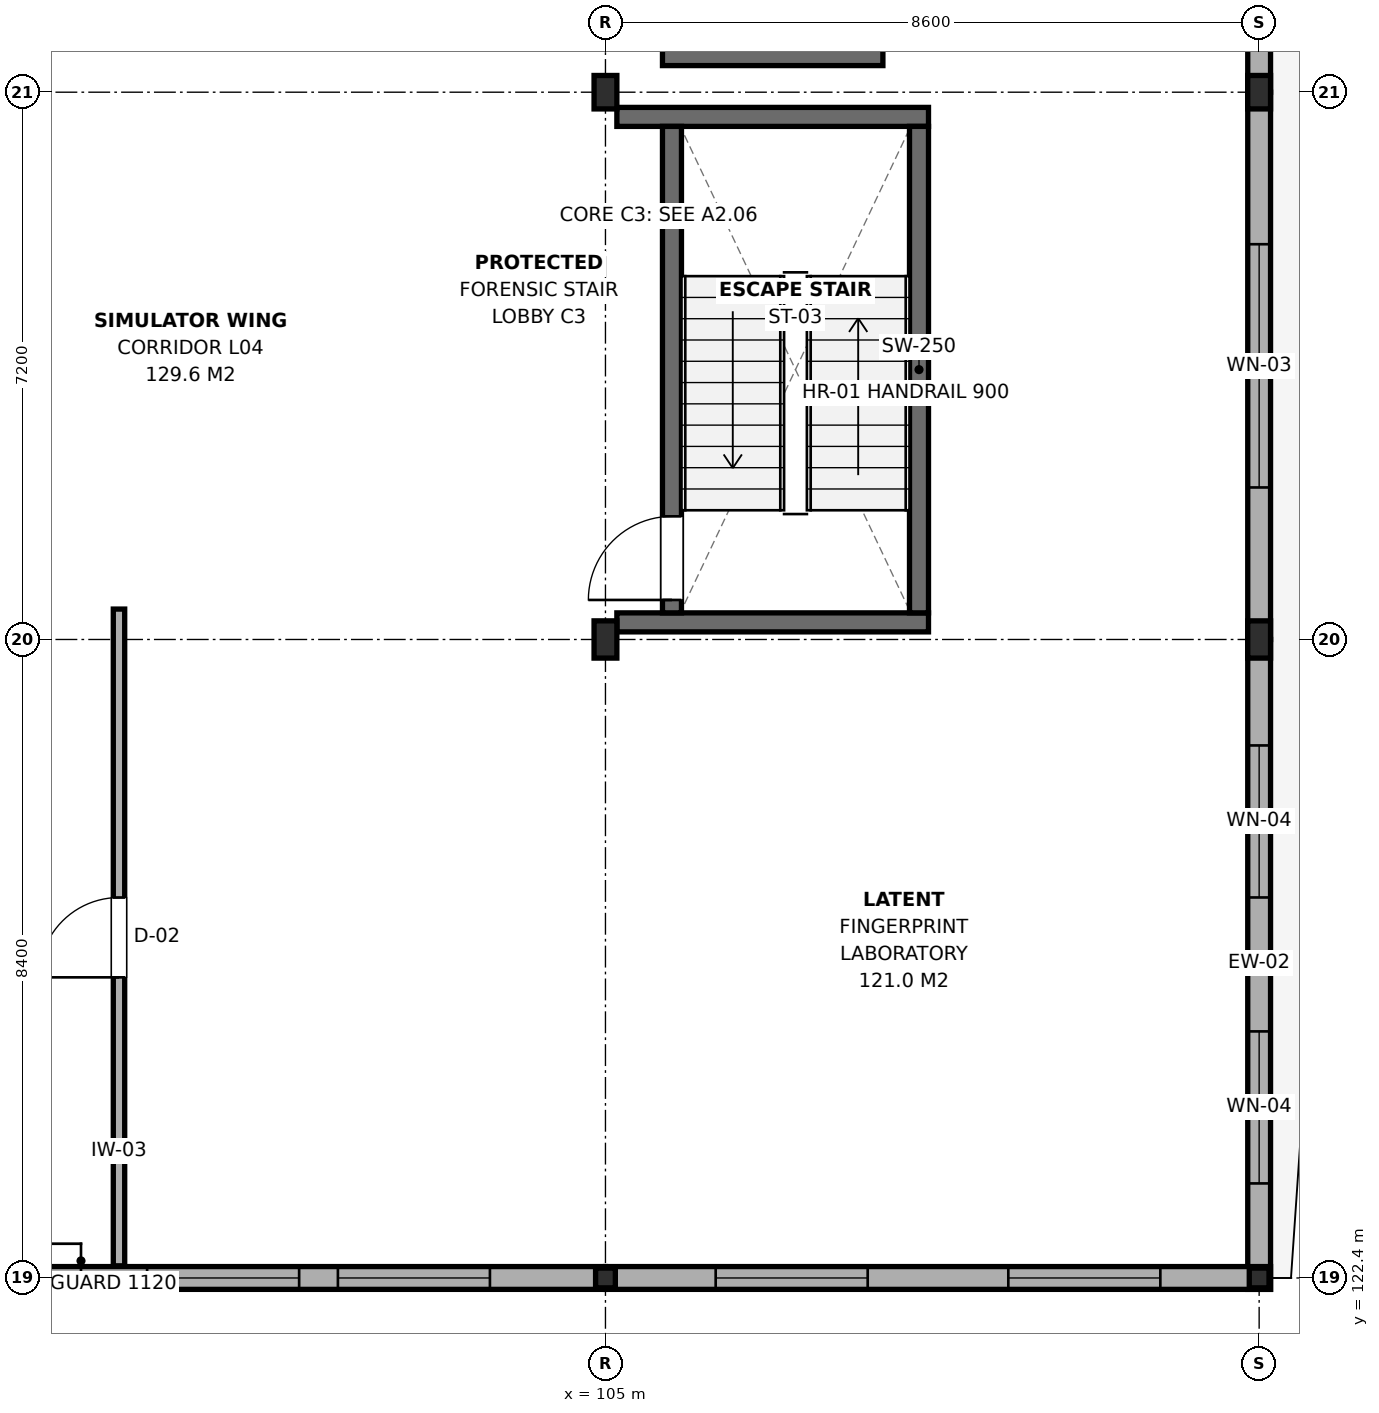
"""IFC4 building model, lengths in metres.
Left out: names, types, materials, properties, quantities, classifications, styles, units other than length and angle.
Written with IfcOpenShell. Run it as: python <this file> out.ifc"""

import sys

from ifc_helpers import new_model, si_unit, direction, frame, frame_2d, origin, origin_2d, place, context, subcontext, project, spatial, rectangle, i_section, extrude, element, fill, save


model = new_model("IFC4")
c1 = context("Model", 3, precision=1e-05, world=origin(), true_north=direction((0.0, 1.0)))
c2 = subcontext(c1, "Body", "Model", "MODEL_VIEW")
j1 = project(units=[si_unit("LENGTHUNIT", "METRE"), si_unit("PLANEANGLEUNIT", "RADIAN")], contexts=[c1])
p1 = place(None, origin())
s1 = spatial("IfcSite", under=j1, at=p1, CompositionType="ELEMENT")
p2 = place(p1, origin())
s2 = spatial("IfcBuilding", under=s1, at=p2, CompositionType="ELEMENT")
p3 = place(p2, frame((0.0, 0.0, 17.1)))
s3 = spatial("IfcBuildingStorey", under=s2, at=p3, CompositionType="ELEMENT", Elevation=17.1)
p4 = place(p3, frame((105.0, 122.4, 0.0), z_axis=(0.0, 0.0, 1.0), x_axis=(1.0, 0.0, 0.0)))
e1 = element("IfcColumn", 1, at=p4, inside=s3, PredefinedType="COLUMN", context=c2, shape_type="SweptSolid", body=[
    extrude(i_section(OverallWidth=0.26, OverallDepth=0.26, WebThickness=0.01, FlangeThickness=0.018, FilletRadius=0.024, at=origin_2d()), origin(), (0.0, 0.0, 1.0), 3.9),
])
p5 = place(p3, frame((105.0, 130.8, 0.0), z_axis=(0.0, 0.0, 1.0), x_axis=(1.0, 0.0, 0.0)))
e2 = element("IfcColumn", 2, at=p5, inside=s3, PredefinedType="COLUMN", context=c2, shape_type="SweptSolid", body=[
    extrude(i_section(OverallWidth=0.3, OverallDepth=0.49, WebThickness=0.012, FlangeThickness=0.023, FilletRadius=0.027, at=origin_2d()), origin(), (0.0, 0.0, 1.0), 3.9),
])
p6 = place(p3, frame((105.0, 138.0, 0.0), z_axis=(0.0, 0.0, 1.0), x_axis=(1.0, 0.0, 0.0)))
e3 = element("IfcColumn", 3, at=p6, inside=s3, PredefinedType="COLUMN", context=c2, shape_type="SweptSolid", body=[
    extrude(i_section(OverallWidth=0.3, OverallDepth=0.44, WebThickness=0.011, FlangeThickness=0.021, FilletRadius=0.027, at=origin_2d()), origin(), (0.0, 0.0, 1.0), 3.9),
])
p7 = place(p3, frame((113.6, 122.4, 0.0), z_axis=(0.0, 0.0, 1.0), x_axis=(1.0, 0.0, 0.0)))
e4 = element("IfcColumn", 4, at=p7, inside=s3, PredefinedType="COLUMN", context=c2, shape_type="SweptSolid", body=[
    extrude(i_section(OverallWidth=0.26, OverallDepth=0.26, WebThickness=0.01, FlangeThickness=0.018, FilletRadius=0.024, at=origin_2d()), origin(), (0.0, 0.0, 1.0), 3.9),
])
p8 = place(p3, frame((113.6, 130.8, 0.0), z_axis=(0.0, 0.0, 1.0), x_axis=(1.0, 0.0, 0.0)))
e5 = element("IfcColumn", 5, at=p8, inside=s3, PredefinedType="COLUMN", context=c2, shape_type="SweptSolid", body=[
    extrude(i_section(OverallWidth=0.3, OverallDepth=0.49, WebThickness=0.012, FlangeThickness=0.023, FilletRadius=0.027, at=origin_2d()), origin(), (0.0, 0.0, 1.0), 3.9),
])
p9 = place(p3, frame((113.6, 138.0, 0.0), z_axis=(0.0, 0.0, 1.0), x_axis=(1.0, 0.0, 0.0)))
e6 = element("IfcColumn", 6, at=p9, inside=s3, PredefinedType="COLUMN", context=c2, shape_type="SweptSolid", body=[
    extrude(i_section(OverallWidth=0.3, OverallDepth=0.44, WebThickness=0.011, FlangeThickness=0.021, FilletRadius=0.027, at=origin_2d()), origin(), (0.0, 0.0, 1.0), 3.9),
])
for number, where, z_axis, x_axis in (
    (7, (105.15, 131.025, 0.0), (0.0, 0.0, 1.0), (1.0, 0.0, 0.0)),
    (8, (105.15, 137.675, 0.0), (0.0, 0.0, 1.0), (1.0, 0.0, 0.0)),
):
    element("IfcWall", number, at=place(p3, frame(where, z_axis=z_axis, x_axis=x_axis)), inside=s3, PredefinedType="SHEAR", context=c2, shape_type="SweptSolid", body=[
        extrude(rectangle(XDim=4.1, YDim=0.25, at=frame_2d((2.05, 0.0))), origin(), (0.0, 0.0, 1.0), 3.7),
    ])
p10 = place(p3, frame((105.875, 131.15, 0.0), z_axis=(0.0, 0.0, 1.0), x_axis=(0.0, 1.0, 0.0)))
e9 = element("IfcWall", 9, at=p10, inside=s3, PredefinedType="SHEAR", context=c2, shape_type="SweptSolid", body=[
    extrude(rectangle(XDim=6.4, YDim=0.25, at=frame_2d((3.2, 0.0))), origin(), (0.0, 0.0, 1.0), 3.7),
])
p11 = place(p10, frame((0.17, 0.0, 0.0)))
e10 = element("IfcOpeningElement", 10, at=p11, cuts=e9, PredefinedType="OPENING", context=c2, shape_type="SweptSolid", body=[
    extrude(rectangle(XDim=1.1, YDim=2.15, at=frame_2d((0.55, 1.075))), frame((0.0, 0.14, 0.0), z_axis=(0.0, -1.0, 0.0), x_axis=(1.0, 0.0, 0.0)), (0.0, 0.0, 1.0), 0.28),
])
p12 = place(p3, frame((109.125, 131.15, 0.0), z_axis=(0.0, 0.0, 1.0), x_axis=(0.0, 1.0, 0.0)))
e11 = element("IfcWall", 11, at=p12, inside=s3, PredefinedType="SHEAR", context=c2, shape_type="SweptSolid", body=[
    extrude(rectangle(XDim=6.4, YDim=0.25, at=frame_2d((3.2, 0.0))), origin(), (0.0, 0.0, 1.0), 3.7),
])
p13 = place(p3, frame((105.75, 138.475, 0.0), z_axis=(0.0, 0.0, 1.0), x_axis=(1.0, 0.0, 0.0)))
e12 = element("IfcWall", 12, at=p13, inside=s3, PredefinedType="SHEAR", context=c2, shape_type="SweptSolid", body=[
    extrude(rectangle(XDim=2.9, YDim=0.25, at=frame_2d((1.45, 0.0))), origin(), (0.0, 0.0, 1.0), 3.7),
])
p14 = place(p3, frame((113.6, 122.25, 0.0), z_axis=(0.0, 0.0, 1.0), x_axis=(0.0, 1.0, 0.0)))
e13 = element("IfcWall", 13, at=p14, inside=s3, PredefinedType="SOLIDWALL", context=c2, shape_type="SweptSolid", body=[
    extrude(rectangle(XDim=8.55, YDim=0.3, at=frame_2d((4.275, 0.0))), origin(), (0.0, 0.0, 1.0), 3.345),
])
p15 = place(p14, frame((1.394, 0.0, 0.95)))
e14 = element("IfcOpeningElement", 14, at=p15, cuts=e13, PredefinedType="OPENING", context=c2, shape_type="SweptSolid", body=[
    extrude(rectangle(XDim=2.0, YDim=1.8, at=frame_2d((1.0, 0.9))), frame((0.0, 0.165, 0.0), z_axis=(0.0, -1.0, 0.0), x_axis=(1.0, 0.0, 0.0)), (0.0, 0.0, 1.0), 0.33),
])
p16 = place(p14, frame((5.156, 0.0, 0.95)))
e15 = element("IfcOpeningElement", 15, at=p16, cuts=e13, PredefinedType="OPENING", context=c2, shape_type="SweptSolid", body=[
    extrude(rectangle(XDim=2.0, YDim=1.8, at=frame_2d((1.0, 0.9))), frame((0.0, 0.165, 0.0), z_axis=(0.0, -1.0, 0.0), x_axis=(1.0, 0.0, 0.0)), (0.0, 0.0, 1.0), 0.33),
])
p17 = place(p3, frame((113.6, 130.8, 0.0), z_axis=(0.0, 0.0, 1.0), x_axis=(0.0, 1.0, 0.0)))
e16 = element("IfcWall", 16, at=p17, inside=s3, PredefinedType="SOLIDWALL", context=c2, shape_type="SweptSolid", body=[
    extrude(rectangle(XDim=7.2, YDim=0.3, at=frame_2d((3.6, 0.0))), origin(), (0.0, 0.0, 1.0), 3.345),
])
p18 = place(p17, frame((2.0, 0.0, 0.95)))
e17 = element("IfcOpeningElement", 17, at=p18, cuts=e16, PredefinedType="OPENING", context=c2, shape_type="SweptSolid", body=[
    extrude(rectangle(XDim=3.2, YDim=2.2, at=frame_2d((1.6, 1.1))), frame((0.0, 0.165, 0.0), z_axis=(0.0, -1.0, 0.0), x_axis=(1.0, 0.0, 0.0)), (0.0, 0.0, 1.0), 0.33),
])
p19 = place(p3, frame((113.6, 138.0, 0.0), z_axis=(0.0, 0.0, 1.0), x_axis=(0.0, 1.0, 0.0)))
e18 = element("IfcWall", 18, at=p19, inside=s3, PredefinedType="SOLIDWALL", context=c2, shape_type="SweptSolid", body=[
    extrude(rectangle(XDim=7.2, YDim=0.3, at=frame_2d((3.6, 0.0))), origin(), (0.0, 0.0, 1.0), 3.095),
])
p20 = place(p19, frame((1.75, 0.0, 0.65)))
e19 = element("IfcOpeningElement", 19, at=p20, cuts=e18, PredefinedType="OPENING", context=c2, shape_type="SweptSolid", body=[
    extrude(rectangle(XDim=1.8, YDim=1.2, at=frame_2d((0.9, 0.6))), frame((0.0, 0.165, 0.0), z_axis=(0.0, -1.0, 0.0), x_axis=(1.0, 0.0, 0.0)), (0.0, 0.0, 1.0), 0.33),
])
p21 = place(p3, frame((96.0, 122.4, 0.0), z_axis=(0.0, 0.0, 1.0), x_axis=(1.0, 0.0, 0.0)))
e20 = element("IfcWall", 20, at=p21, inside=s3, PredefinedType="SOLIDWALL", context=c2, shape_type="SweptSolid", body=[
    extrude(rectangle(XDim=9.0, YDim=0.3, at=frame_2d((4.5, 0.0))), origin(), (0.0, 0.0, 1.0), 3.155),
])
p22 = place(p21, frame((2.97, 0.0, 0.65)))
e21 = element("IfcOpeningElement", 21, at=p22, cuts=e20, PredefinedType="OPENING", context=c2, shape_type="SweptSolid", body=[
    extrude(rectangle(XDim=2.0, YDim=1.8, at=frame_2d((1.0, 0.9))), frame((0.0, 0.165, 0.0), z_axis=(0.0, -1.0, 0.0), x_axis=(1.0, 0.0, 0.0)), (0.0, 0.0, 1.0), 0.33),
])
p23 = place(p21, frame((5.48, 0.0, 0.65)))
e22 = element("IfcOpeningElement", 22, at=p23, cuts=e20, PredefinedType="OPENING", context=c2, shape_type="SweptSolid", body=[
    extrude(rectangle(XDim=2.0, YDim=1.8, at=frame_2d((1.0, 0.9))), frame((0.0, 0.165, 0.0), z_axis=(0.0, -1.0, 0.0), x_axis=(1.0, 0.0, 0.0)), (0.0, 0.0, 1.0), 0.33),
])
p24 = place(p3, frame((105.0, 122.4, 0.0), z_axis=(0.0, 0.0, 1.0), x_axis=(1.0, 0.0, 0.0)))
e23 = element("IfcWall", 23, at=p24, inside=s3, PredefinedType="SOLIDWALL", context=c2, shape_type="SweptSolid", body=[
    extrude(rectangle(XDim=8.75, YDim=0.3, at=frame_2d((4.375, 0.0))), origin(), (0.0, 0.0, 1.0), 3.205),
])
p25 = place(p24, frame((1.45, 0.0, 0.65)))
e24 = element("IfcOpeningElement", 24, at=p25, cuts=e23, PredefinedType="OPENING", context=c2, shape_type="SweptSolid", body=[
    extrude(rectangle(XDim=2.0, YDim=1.8, at=frame_2d((1.0, 0.9))), frame((0.0, 0.165, 0.0), z_axis=(0.0, -1.0, 0.0), x_axis=(1.0, 0.0, 0.0)), (0.0, 0.0, 1.0), 0.33),
])
p26 = place(p24, frame((5.3, 0.0, 0.65)))
e25 = element("IfcOpeningElement", 25, at=p26, cuts=e23, PredefinedType="OPENING", context=c2, shape_type="SweptSolid", body=[
    extrude(rectangle(XDim=2.0, YDim=1.8, at=frame_2d((1.0, 0.9))), frame((0.0, 0.165, 0.0), z_axis=(0.0, -1.0, 0.0), x_axis=(1.0, 0.0, 0.0)), (0.0, 0.0, 1.0), 0.33),
])
p27 = place(p3, frame((98.6, 122.56, 0.0), z_axis=(0.0, 0.0, 1.0), x_axis=(0.0, 1.0, 0.0)))
e26 = element("IfcWall", 26, at=p27, inside=s3, PredefinedType="PARTITIONING", context=c2, shape_type="SweptSolid", body=[
    extrude(rectangle(XDim=8.64, YDim=0.15, at=frame_2d((4.32, 0.0))), origin(), (0.0, 0.0, 1.0), 3.205),
])
p28 = place(p27, frame((3.795, 0.0, 0.0)))
e27 = element("IfcOpeningElement", 27, at=p28, cuts=e26, PredefinedType="OPENING", context=c2, shape_type="SweptSolid", body=[
    extrude(rectangle(XDim=1.05, YDim=2.15, at=frame_2d((0.525, 1.075))), frame((0.0, 0.09, 0.0), z_axis=(0.0, -1.0, 0.0), x_axis=(1.0, 0.0, 0.0)), (0.0, 0.0, 1.0), 0.18),
])
p29 = place(p15, origin())
e28 = element("IfcWindow", 28, at=p29, inside=s3, PartitioningType="SINGLE_PANEL", PredefinedType="WINDOW", context=c2, shape_type="SweptSolid", body=[
    extrude(rectangle(XDim=2.0, YDim=1.8, at=frame_2d((1.0, 0.9))), frame((0.0, 0.03, 0.0), z_axis=(0.0, -1.0, 0.0), x_axis=(1.0, 0.0, 0.0)), (0.0, 0.0, 1.0), 0.06),
])
fill(e14, e28)
p30 = place(p16, origin())
e29 = element("IfcWindow", 29, at=p30, inside=s3, PartitioningType="SINGLE_PANEL", PredefinedType="WINDOW", context=c2, shape_type="SweptSolid", body=[
    extrude(rectangle(XDim=2.0, YDim=1.8, at=frame_2d((1.0, 0.9))), frame((0.0, 0.03, 0.0), z_axis=(0.0, -1.0, 0.0), x_axis=(1.0, 0.0, 0.0)), (0.0, 0.0, 1.0), 0.06),
])
fill(e15, e29)
p31 = place(p18, origin())
e30 = element("IfcWindow", 30, at=p31, inside=s3, PartitioningType="SINGLE_PANEL", PredefinedType="WINDOW", context=c2, shape_type="SweptSolid", body=[
    extrude(rectangle(XDim=3.2, YDim=2.2, at=frame_2d((1.6, 1.1))), frame((0.0, 0.03, 0.0), z_axis=(0.0, -1.0, 0.0), x_axis=(1.0, 0.0, 0.0)), (0.0, 0.0, 1.0), 0.06),
])
fill(e17, e30)
p32 = place(p22, origin())
e31 = element("IfcWindow", 31, at=p32, inside=s3, PartitioningType="SINGLE_PANEL", PredefinedType="WINDOW", context=c2, shape_type="SweptSolid", body=[
    extrude(rectangle(XDim=2.0, YDim=1.8, at=frame_2d((1.0, 0.9))), frame((0.0, 0.03, 0.0), z_axis=(0.0, -1.0, 0.0), x_axis=(1.0, 0.0, 0.0)), (0.0, 0.0, 1.0), 0.06),
])
fill(e21, e31)
p33 = place(p23, origin())
e32 = element("IfcWindow", 32, at=p33, inside=s3, PartitioningType="SINGLE_PANEL", PredefinedType="WINDOW", context=c2, shape_type="SweptSolid", body=[
    extrude(rectangle(XDim=2.0, YDim=1.8, at=frame_2d((1.0, 0.9))), frame((0.0, 0.03, 0.0), z_axis=(0.0, -1.0, 0.0), x_axis=(1.0, 0.0, 0.0)), (0.0, 0.0, 1.0), 0.06),
])
fill(e22, e32)
p34 = place(p25, origin())
e33 = element("IfcWindow", 33, at=p34, inside=s3, PartitioningType="SINGLE_PANEL", PredefinedType="WINDOW", context=c2, shape_type="SweptSolid", body=[
    extrude(rectangle(XDim=2.0, YDim=1.8, at=frame_2d((1.0, 0.9))), frame((0.0, 0.03, 0.0), z_axis=(0.0, -1.0, 0.0), x_axis=(1.0, 0.0, 0.0)), (0.0, 0.0, 1.0), 0.06),
])
fill(e24, e33)
p35 = place(p26, origin())
e34 = element("IfcWindow", 34, at=p35, inside=s3, PartitioningType="SINGLE_PANEL", PredefinedType="WINDOW", context=c2, shape_type="SweptSolid", body=[
    extrude(rectangle(XDim=2.0, YDim=1.8, at=frame_2d((1.0, 0.9))), frame((0.0, 0.03, 0.0), z_axis=(0.0, -1.0, 0.0), x_axis=(1.0, 0.0, 0.0)), (0.0, 0.0, 1.0), 0.06),
])
fill(e25, e34)
p36 = place(p11, origin())
e35 = element("IfcDoor", 35, at=p36, inside=s3, OperationType="SINGLE_SWING_LEFT", PredefinedType="DOOR", context=c2, shape_type="SweptSolid", body=[
    extrude(rectangle(XDim=1.1, YDim=2.15, at=frame_2d((0.55, 1.075))), frame((0.0, 0.025, 0.0), z_axis=(0.0, -1.0, 0.0), x_axis=(1.0, 0.0, 0.0)), (0.0, 0.0, 1.0), 0.05),
])
fill(e10, e35)
p37 = place(p28, origin())
e36 = element("IfcDoor", 36, at=p37, inside=s3, OperationType="SINGLE_SWING_LEFT", PredefinedType="DOOR", context=c2, shape_type="SweptSolid", body=[
    extrude(rectangle(XDim=1.05, YDim=2.15, at=frame_2d((0.525, 1.075))), frame((0.0, 0.025, 0.0), z_axis=(0.0, -1.0, 0.0), x_axis=(1.0, 0.0, 0.0)), (0.0, 0.0, 1.0), 0.05),
])
fill(e27, e36)
save(model, sys.argv[1])
